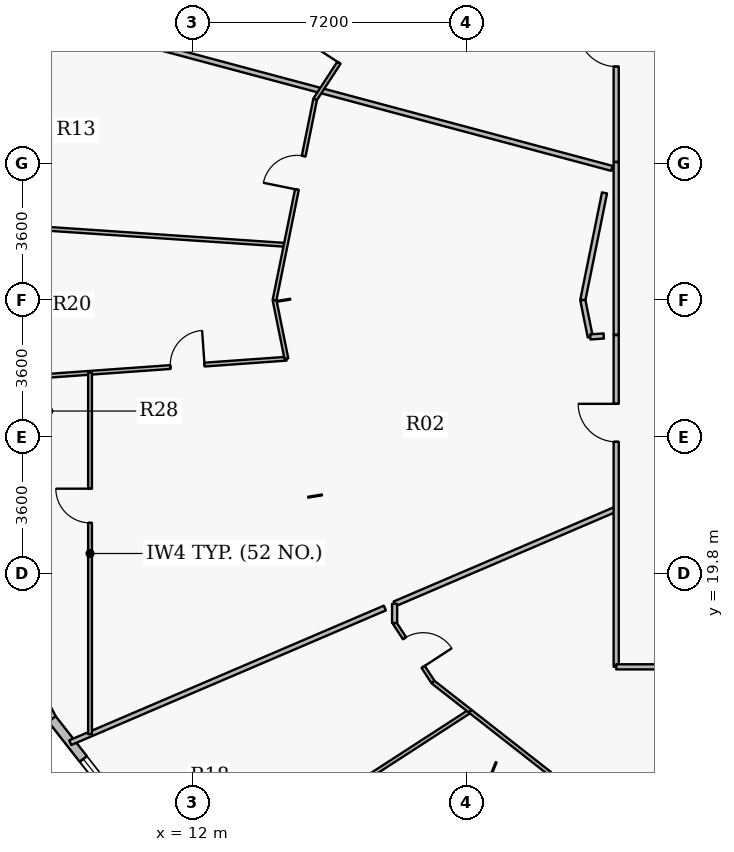
"""IFC4 building model, lengths in metres.
Left out: names, types, materials, properties, quantities, classifications, styles, units other than length and angle.
Written with IfcOpenShell. Run it as: python <this file> out.ifc"""

import sys

from ifc_helpers import new_model, si_unit, direction, frame, frame_2d, origin, origin_2d, place, context, subcontext, project, spatial, rectangle, extrude, source, transform, mapped, element, fill, save


model = new_model("IFC4")
c1 = context("Model", 3, precision=1e-05, world=origin(), true_north=direction((0.0, 1.0)))
c2 = subcontext(c1, "Body", "Model", "MODEL_VIEW")
j1 = project(units=[si_unit("LENGTHUNIT", "METRE"), si_unit("PLANEANGLEUNIT", "RADIAN")], contexts=[c1])
p1 = place(None, origin())
s1 = spatial("IfcSite", under=j1, at=p1, CompositionType="ELEMENT")
p2 = place(p1, origin())
s2 = spatial("IfcBuilding", under=s1, at=p2, CompositionType="ELEMENT")
p3 = place(p2, frame((0.0, 0.0, 70.2)))
s3 = spatial("IfcBuildingStorey", under=s2, at=p3, CompositionType="ELEMENT", Elevation=70.2)
p4 = place(p3, frame((8.305, 15.977, 0.0), z_axis=(0.0, 0.0, 1.0), x_axis=(-0.467662443071, 0.883907144072, 0.0)))
e1 = element("IfcWall", 1, at=p4, inside=s3, PredefinedType="SOLIDWALL", context=c2, shape_type="SweptSolid", body=[
    extrude(rectangle(XDim=3.984, YDim=0.24, at=frame_2d((1.992, 0.0))), origin(), (0.0, 0.0, 1.0), 3.95),
])
p5 = place(p3, frame((10.85, 12.725, 0.0), z_axis=(0.0, 0.0, 1.0), x_axis=(-0.616295508253, 0.787514981767, 0.0)))
e2 = element("IfcWall", 2, at=p5, inside=s3, PredefinedType="SOLIDWALL", context=c2, shape_type="SweptSolid", body=[
    extrude(rectangle(XDim=4.129, YDim=0.24, at=frame_2d((2.065, 0.0))), origin(), (0.0, 0.0, 1.0), 3.95),
])
p6 = place(p5, frame((0.795, 0.0, 0.9)))
e3 = element("IfcOpeningElement", 3, at=p6, cuts=e2, PredefinedType="OPENING", context=c2, shape_type="SweptSolid", body=[
    extrude(rectangle(XDim=2.0, YDim=1.75, at=origin_2d()), frame((1.0, 0.13, 0.875), z_axis=(0.0, -1.0, 0.0), x_axis=(1.0, 0.0, 0.0)), (0.0, 0.0, 1.0), 0.26),
])
p7 = place(p3, frame((5.129, 29.083, 0.0), z_axis=(0.0, 0.0, 1.0), x_axis=(0.997731551972, -0.067318275369, 0.0)))
e4 = element("IfcWall", 4, at=p7, inside=s3, PredefinedType="PARTITIONING", context=c2, shape_type="SweptSolid", body=[
    extrude(rectangle(XDim=9.346, YDim=0.1, at=frame_2d((4.673, 0.0))), origin(), (0.0, 0.0, 1.0), 3.335),
])
p8 = place(p3, frame((5.142, 24.789, 0.0), z_axis=(0.0, 0.0, 1.0), x_axis=(0.997443041409, 0.071465929957, 0.0)))
e5 = element("IfcWall", 5, at=p8, inside=s3, PredefinedType="PARTITIONING", context=c2, shape_type="SweptSolid", body=[
    extrude(rectangle(XDim=9.354, YDim=0.1, at=frame_2d((4.677, 0.0))), origin(), (0.0, 0.0, 1.0), 3.335),
])
p9 = place(p8, frame((6.293, 0.0, 0.0)))
e6 = element("IfcOpeningElement", 6, at=p9, cuts=e5, PredefinedType="OPENING", context=c2, shape_type="SweptSolid", body=[
    extrude(rectangle(XDim=0.9, YDim=2.1, at=origin_2d()), frame((0.45, 0.06, 1.05), z_axis=(0.0, -1.0, 0.0), x_axis=(1.0, 0.0, 0.0)), (0.0, 0.0, 1.0), 0.12),
])
p10 = place(p8, frame((0.75, 0.0, 0.0)))
e7 = element("IfcOpeningElement", 7, at=p10, cuts=e5, PredefinedType="OPENING", context=c2, shape_type="SweptSolid", body=[
    extrude(rectangle(XDim=0.82, YDim=2.1, at=origin_2d()), frame((0.41, 0.06, 1.05), z_axis=(0.0, -1.0, 0.0), x_axis=(1.0, 0.0, 0.0)), (0.0, 0.0, 1.0), 0.12),
])
p11 = place(p3, frame((6.623, 34.854, 0.0), z_axis=(0.0, 0.0, 1.0), x_axis=(0.966073053026, -0.258268961003, 0.0)))
e8 = element("IfcWall", 8, at=p11, inside=s3, PredefinedType="PARTITIONING", context=c2, shape_type="SweptSolid", body=[
    extrude(rectangle(XDim=16.991, YDim=0.135, at=frame_2d((8.495, 0.0))), origin(), (0.0, 0.0, 1.0), 3.335),
])
p12 = place(p3, frame((8.785, 15.356, 0.0), z_axis=(0.0, 0.0, 1.0), x_axis=(0.919377695517, 0.393375968998, 0.0)))
e9 = element("IfcWall", 9, at=p12, inside=s3, PredefinedType="PARTITIONING", context=c2, shape_type="SweptSolid", body=[
    extrude(rectangle(XDim=9.003, YDim=0.135, at=frame_2d((4.502, 0.0))), origin(), (0.0, 0.0, 1.0), 3.335),
])
p13 = place(p3, frame((9.305, 15.578, 0.0), z_axis=(0.0, 0.0, 1.0), x_axis=(0.0, 1.0, 0.0)))
e10 = element("IfcWall", 10, at=p13, inside=s3, PredefinedType="PARTITIONING", context=c2, shape_type="SweptSolid", body=[
    extrude(rectangle(XDim=9.509, YDim=0.1, at=frame_2d((4.755, 0.0))), origin(), (0.0, 0.0, 1.0), 3.285),
])
p14 = place(p13, frame((5.56, 0.0, 0.0)))
e11 = element("IfcOpeningElement", 11, at=p14, cuts=e10, PredefinedType="OPENING", context=c2, shape_type="SweptSolid", body=[
    extrude(rectangle(XDim=0.9, YDim=2.1, at=origin_2d()), frame((0.45, 0.06, 1.05), z_axis=(0.0, -1.0, 0.0), x_axis=(1.0, 0.0, 0.0)), (0.0, 0.0, 1.0), 0.12),
])
p15 = place(p3, frame((12.133, 11.542, 0.0), z_axis=(0.0, 0.0, 1.0), x_axis=(0.839345439493, 0.5435984117, 0.0)))
e12 = element("IfcWall", 12, at=p15, inside=s3, PredefinedType="PARTITIONING", context=c2, shape_type="SweptSolid", body=[
    extrude(rectangle(XDim=8.543, YDim=0.1, at=frame_2d((4.271, 0.0))), origin(), (0.0, 0.0, 1.0), 3.335),
])
p16 = place(p3, frame((14.16, 27.0, 0.0), z_axis=(0.0, 0.0, 1.0), x_axis=(0.198233557602, -0.980154812588, 0.0)))
e13 = element("IfcWall", 13, at=p16, inside=s3, PredefinedType="PARTITIONING", context=c2, shape_type="SweptSolid", body=[
    extrude(rectangle(XDim=1.574, YDim=0.1, at=frame_2d((0.787, 0.0))), origin(), (0.0, 0.0, 1.0), 3.285),
])
p17 = place(p3, frame((14.16, 27.0, 0.0), z_axis=(0.0, 0.0, 1.0), x_axis=(0.198292702032, 0.980142848936, 0.0)))
e14 = element("IfcWall", 14, at=p17, inside=s3, PredefinedType="PARTITIONING", context=c2, shape_type="SweptSolid", body=[
    extrude(rectangle(XDim=5.392, YDim=0.1, at=frame_2d((2.696, 0.0))), origin(), (0.0, 0.0, 1.0), 3.285),
])
p18 = place(p17, frame((2.967, 0.0, 0.0)))
e15 = element("IfcOpeningElement", 15, at=p18, cuts=e14, PredefinedType="OPENING", context=c2, shape_type="SweptSolid", body=[
    extrude(rectangle(XDim=0.9, YDim=2.1, at=origin_2d()), frame((0.45, 0.06, 1.05), z_axis=(0.0, -1.0, 0.0), x_axis=(1.0, 0.0, 0.0)), (0.0, 0.0, 1.0), 0.12),
])
p19 = place(p3, frame((15.048, 9.127, 0.0), z_axis=(0.0, 0.0, 1.0), x_axis=(0.760804650013, 0.648980958517, 0.0)))
e16 = element("IfcWall", 16, at=p19, inside=s3, PredefinedType="PARTITIONING", context=c2, shape_type="SweptSolid", body=[
    extrude(rectangle(XDim=8.349, YDim=0.1, at=frame_2d((4.174, 0.0))), origin(), (0.0, 0.0, 1.0), 3.335),
])
p20 = place(p19, frame((5.197, 0.0, 0.0)))
e17 = element("IfcOpeningElement", 17, at=p20, cuts=e16, PredefinedType="OPENING", context=c2, shape_type="SweptSolid", body=[
    extrude(rectangle(XDim=0.9, YDim=2.1, at=origin_2d()), frame((0.45, 0.06, 1.05), z_axis=(0.0, -1.0, 0.0), x_axis=(1.0, 0.0, 0.0)), (0.0, 0.0, 1.0), 0.12),
])
p21 = place(p3, frame((15.229, 32.284, 0.0), z_axis=(0.0, 0.0, 1.0), x_axis=(0.545394142426, 0.83817971188, 0.0)))
e18 = element("IfcWall", 18, at=p21, inside=s3, PredefinedType="PARTITIONING", context=c2, shape_type="SweptSolid", body=[
    extrude(rectangle(XDim=5.688, YDim=0.1, at=frame_2d((2.844, 0.0))), origin(), (0.0, 0.0, 1.0), 3.285),
])
p22 = place(p21, frame((1.146, 0.0, 0.0)))
e19 = element("IfcOpeningElement", 19, at=p22, cuts=e18, PredefinedType="OPENING", context=c2, shape_type="SweptSolid", body=[
    extrude(rectangle(XDim=0.9, YDim=2.1, at=origin_2d()), frame((0.45, 0.06, 1.05), z_axis=(0.0, -1.0, 0.0), x_axis=(1.0, 0.0, 0.0)), (0.0, 0.0, 1.0), 0.12),
])
p23 = place(p3, frame((17.319, 18.503, 0.0), z_axis=(0.0, 0.0, 1.0), x_axis=(0.54537223853, -0.838193964092, 0.0)))
e20 = element("IfcWall", 20, at=p23, inside=s3, PredefinedType="PARTITIONING", context=c2, shape_type="SweptSolid", body=[
    extrude(rectangle(XDim=1.855, YDim=0.1, at=frame_2d((0.927, 0.0))), origin(), (0.0, 0.0, 1.0), 3.95),
])
p24 = place(p23, frame((0.478, 0.0, 0.0)))
e21 = element("IfcOpeningElement", 21, at=p24, cuts=e20, PredefinedType="OPENING", context=c2, shape_type="SweptSolid", body=[
    extrude(rectangle(XDim=0.9, YDim=2.1, at=origin_2d()), frame((0.45, 0.06, 1.05), z_axis=(0.0, -1.0, 0.0), x_axis=(1.0, 0.0, 0.0)), (0.0, 0.0, 1.0), 0.12),
])
p25 = place(p3, frame((17.319, 19.007, 0.0), z_axis=(0.0, 0.0, 1.0), x_axis=(0.919369884618, 0.393394223721, 0.0)))
e22 = element("IfcWall", 22, at=p25, inside=s3, PredefinedType="PARTITIONING", context=c2, shape_type="SweptSolid", body=[
    extrude(rectangle(XDim=6.342, YDim=0.135, at=frame_2d((3.171, 0.0))), origin(), (0.0, 0.0, 1.0), 3.95),
])
p26 = place(p3, frame((18.331, 16.948, 0.0), z_axis=(0.0, 0.0, 1.0), x_axis=(0.787379901086, -0.61646807814, 0.0)))
e23 = element("IfcWall", 23, at=p26, inside=s3, PredefinedType="PARTITIONING", context=c2, shape_type="SweptSolid", body=[
    extrude(rectangle(XDim=1.236, YDim=0.1, at=frame_2d((0.618, 0.0))), origin(), (0.0, 0.0, 1.0), 3.95),
])
p27 = place(p3, frame((19.312, 16.18, 0.0), z_axis=(0.0, 0.0, 1.0), x_axis=(0.787365097885, -0.616486984967, 0.0)))
e24 = element("IfcWall", 24, at=p27, inside=s3, PredefinedType="PARTITIONING", context=c2, shape_type="SweptSolid", body=[
    extrude(rectangle(XDim=2.652, YDim=0.1, at=frame_2d((1.326, 0.0))), origin(), (0.0, 0.0, 1.0), 3.285),
])
p28 = place(p3, frame((23.15, 17.35, 0.0), z_axis=(0.0, 0.0, 1.0), x_axis=(0.0, 1.0, 0.0)))
e25 = element("IfcWall", 25, at=p28, inside=s3, PredefinedType="PARTITIONING", context=c2, shape_type="SweptSolid", body=[
    extrude(rectangle(XDim=8.729, YDim=0.135, at=frame_2d((4.365, 0.0))), origin(), (0.0, 0.0, 1.0), 3.285),
])
p29 = place(p28, frame((5.921, 0.0, 0.0)))
e26 = element("IfcOpeningElement", 26, at=p29, cuts=e25, PredefinedType="OPENING", context=c2, shape_type="SweptSolid", body=[
    extrude(rectangle(XDim=1.0, YDim=2.15, at=origin_2d()), frame((0.5, 0.078, 1.075), z_axis=(0.0, -1.0, 0.0), x_axis=(1.0, 0.0, 0.0)), (0.0, 0.0, 1.0), 0.155),
])
p30 = place(p3, frame((23.15, 17.35, 0.0), z_axis=(0.0, 0.0, 1.0), x_axis=(1.0, 0.0, 0.0)))
e27 = element("IfcWall", 27, at=p30, inside=s3, PredefinedType="PARTITIONING", context=c2, shape_type="SweptSolid", body=[
    extrude(rectangle(XDim=7.171, YDim=0.135, at=frame_2d((3.586, 0.0))), origin(), (0.0, 0.0, 1.0), 3.285),
])
p31 = place(p30, frame((3.086, 0.0, 0.0)))
e28 = element("IfcOpeningElement", 28, at=p31, cuts=e27, PredefinedType="OPENING", context=c2, shape_type="SweptSolid", body=[
    extrude(rectangle(XDim=1.0, YDim=2.15, at=origin_2d()), frame((0.5, 0.078, 1.075), z_axis=(0.0, -1.0, 0.0), x_axis=(1.0, 0.0, 0.0)), (0.0, 0.0, 1.0), 0.155),
])
p32 = place(p3, frame((23.15, 30.638, 0.0), z_axis=(0.0, 0.0, 1.0), x_axis=(0.0, 1.0, 0.0)))
e29 = element("IfcWall", 29, at=p32, inside=s3, PredefinedType="PARTITIONING", context=c2, shape_type="SweptSolid", body=[
    extrude(rectangle(XDim=6.011, YDim=0.135, at=frame_2d((3.006, 0.0))), origin(), (0.0, 0.0, 1.0), 3.285),
])
p33 = place(p32, frame((2.506, 0.0, 0.0)))
e30 = element("IfcOpeningElement", 30, at=p33, cuts=e29, PredefinedType="OPENING", context=c2, shape_type="SweptSolid", body=[
    extrude(rectangle(XDim=1.0, YDim=2.15, at=origin_2d()), frame((0.5, 0.078, 1.075), z_axis=(0.0, -1.0, 0.0), x_axis=(1.0, 0.0, 0.0)), (0.0, 0.0, 1.0), 0.155),
])
p34 = place(p3, frame((23.15, 26.089, 0.0), z_axis=(0.0, 0.0, 1.0), x_axis=(0.0, 1.0, 0.0)))
e31 = element("IfcWall", 31, at=p34, inside=s3, PredefinedType="PARTITIONING", context=c2, shape_type="SweptSolid", body=[
    extrude(rectangle(XDim=4.539, YDim=0.135, at=frame_2d((2.27, 0.0))), origin(), (0.0, 0.0, 1.0), 3.285),
])
p35 = place(p3, frame((22.843, 29.82, 0.0), z_axis=(0.0, 0.0, 1.0), x_axis=(-0.19828576171, -0.980144253007, 0.0)))
e32 = element("IfcWall", 32, at=p35, inside=s3, PredefinedType="PARTITIONING", context=c2, shape_type="SweptSolid", body=[
    extrude(rectangle(XDim=2.877, YDim=0.135, at=frame_2d((1.439, 0.0))), origin(), (0.0, 0.0, 1.0), 3.285),
])
p36 = place(p3, frame((22.272, 27.0, 0.0), z_axis=(0.0, 0.0, 1.0), x_axis=(0.1983933715, -0.980122477114, 0.0)))
e33 = element("IfcWall", 33, at=p36, inside=s3, PredefinedType="PARTITIONING", context=c2, shape_type="SweptSolid", body=[
    extrude(rectangle(XDim=0.99, YDim=0.135, at=frame_2d((0.495, 0.0))), origin(), (0.0, 0.0, 1.0), 3.285),
])
p37 = place(p3, frame((22.468, 26.03, 0.0), z_axis=(0.0, 0.0, 1.0), x_axis=(0.997441222806, 0.071491307493, 0.0)))
e34 = element("IfcWall", 34, at=p37, inside=s3, PredefinedType="PARTITIONING", context=c2, shape_type="SweptSolid", body=[
    extrude(rectangle(XDim=0.355, YDim=0.135, at=frame_2d((0.178, 0.0))), origin(), (0.0, 0.0, 1.0), 3.95),
])
p38 = place(p3, frame((17.319, 18.503, 0.0), z_axis=(0.0, 0.0, 1.0), x_axis=(0.0, 1.0, 0.0)))
e35 = element("IfcWall", 35, at=p38, inside=s3, PredefinedType="PARTITIONING", context=c2, shape_type="SweptSolid", body=[
    extrude(rectangle(XDim=0.504, YDim=0.135, at=frame_2d((0.252, 0.0))), origin(), (0.0, 0.0, 1.0), 3.95),
])
m1 = source(origin(), c2, "Body", "SweptSolid", [
    extrude(rectangle(XDim=2.0, YDim=1.75, at=origin_2d()), frame((1.0, 0.03, 0.875), z_axis=(0.0, -1.0, 0.0), x_axis=(1.0, 0.0, 0.0)), (0.0, 0.0, 1.0), 0.06),
])
p39 = place(p6, origin())
e36 = element("IfcWindow", 36, at=p39, inside=s3, PartitioningType="DOUBLE_PANEL_VERTICAL", PredefinedType="WINDOW", context=c2, shape_type="MappedRepresentation", body=[
    mapped(m1, transform((0.0, 0.0, 0.0), x_axis=(1.0, 0.0, 0.0), y_axis=(0.0, 1.0, 0.0), z_axis=(0.0, 0.0, 1.0), scale=1.0)),
])
fill(e3, e36)
m2 = source(origin(), c2, "Body", "SweptSolid", [
    extrude(rectangle(XDim=1.0, YDim=2.15, at=origin_2d()), frame((0.5, 0.025, 1.075), z_axis=(0.0, -1.0, 0.0), x_axis=(1.0, 0.0, 0.0)), (0.0, 0.0, 1.0), 0.05),
])
p40 = place(p33, origin())
e37 = element("IfcDoor", 37, at=p40, inside=s3, OperationType="SINGLE_SWING_RIGHT", PredefinedType="DOOR", context=c2, shape_type="MappedRepresentation", body=[
    mapped(m2, transform((0.0, 0.0, 0.0), x_axis=(1.0, 0.0, 0.0), y_axis=(0.0, 1.0, 0.0), z_axis=(0.0, 0.0, 1.0), scale=1.0)),
])
fill(e30, e37)
m3 = source(origin(), c2, "Body", "SweptSolid", [
    extrude(rectangle(XDim=0.9, YDim=2.1, at=origin_2d()), frame((0.45, 0.025, 1.05), z_axis=(0.0, -1.0, 0.0), x_axis=(1.0, 0.0, 0.0)), (0.0, 0.0, 1.0), 0.05),
])
p41 = place(p22, origin())
e38 = element("IfcDoor", 38, at=p41, inside=s3, OperationType="SINGLE_SWING_LEFT", PredefinedType="DOOR", context=c2, shape_type="MappedRepresentation", body=[
    mapped(m3, transform((0.0, 0.0, 0.0), x_axis=(1.0, 0.0, 0.0), y_axis=(0.0, 1.0, 0.0), z_axis=(0.0, 0.0, 1.0), scale=1.0)),
])
fill(e19, e38)
p42 = place(p29, origin())
e39 = element("IfcDoor", 39, at=p42, inside=s3, OperationType="SINGLE_SWING_RIGHT", PredefinedType="DOOR", context=c2, shape_type="MappedRepresentation", body=[
    mapped(m2, transform((0.0, 0.0, 0.0), x_axis=(1.0, 0.0, 0.0), y_axis=(0.0, 1.0, 0.0), z_axis=(0.0, 0.0, 1.0), scale=1.0)),
])
fill(e26, e39)
p43 = place(p18, origin())
e40 = element("IfcDoor", 40, at=p43, inside=s3, OperationType="SINGLE_SWING_LEFT", PredefinedType="DOOR", context=c2, shape_type="MappedRepresentation", body=[
    mapped(m3, transform((0.0, 0.0, 0.0), x_axis=(1.0, 0.0, 0.0), y_axis=(0.0, 1.0, 0.0), z_axis=(0.0, 0.0, 1.0), scale=1.0)),
])
fill(e15, e40)
p44 = place(p9, origin())
e41 = element("IfcDoor", 41, at=p44, inside=s3, OperationType="SINGLE_SWING_RIGHT", PredefinedType="DOOR", context=c2, shape_type="MappedRepresentation", body=[
    mapped(m3, transform((0.0, 0.0, 0.0), x_axis=(1.0, 0.0, 0.0), y_axis=(0.0, 1.0, 0.0), z_axis=(0.0, 0.0, 1.0), scale=1.0)),
])
fill(e6, e41)
p45 = place(p14, origin())
e42 = element("IfcDoor", 42, at=p45, inside=s3, OperationType="SINGLE_SWING_RIGHT", PredefinedType="DOOR", context=c2, shape_type="MappedRepresentation", body=[
    mapped(m3, transform((0.0, 0.0, 0.0), x_axis=(1.0, 0.0, 0.0), y_axis=(0.0, 1.0, 0.0), z_axis=(0.0, 0.0, 1.0), scale=1.0)),
])
fill(e11, e42)
p46 = place(p24, origin())
e43 = element("IfcDoor", 43, at=p46, inside=s3, OperationType="SINGLE_SWING_RIGHT", PredefinedType="DOOR", context=c2, shape_type="MappedRepresentation", body=[
    mapped(m3, transform((0.0, 0.0, 0.0), x_axis=(1.0, 0.0, 0.0), y_axis=(0.0, 1.0, 0.0), z_axis=(0.0, 0.0, 1.0), scale=1.0)),
])
fill(e21, e43)
save(model, sys.argv[1])
